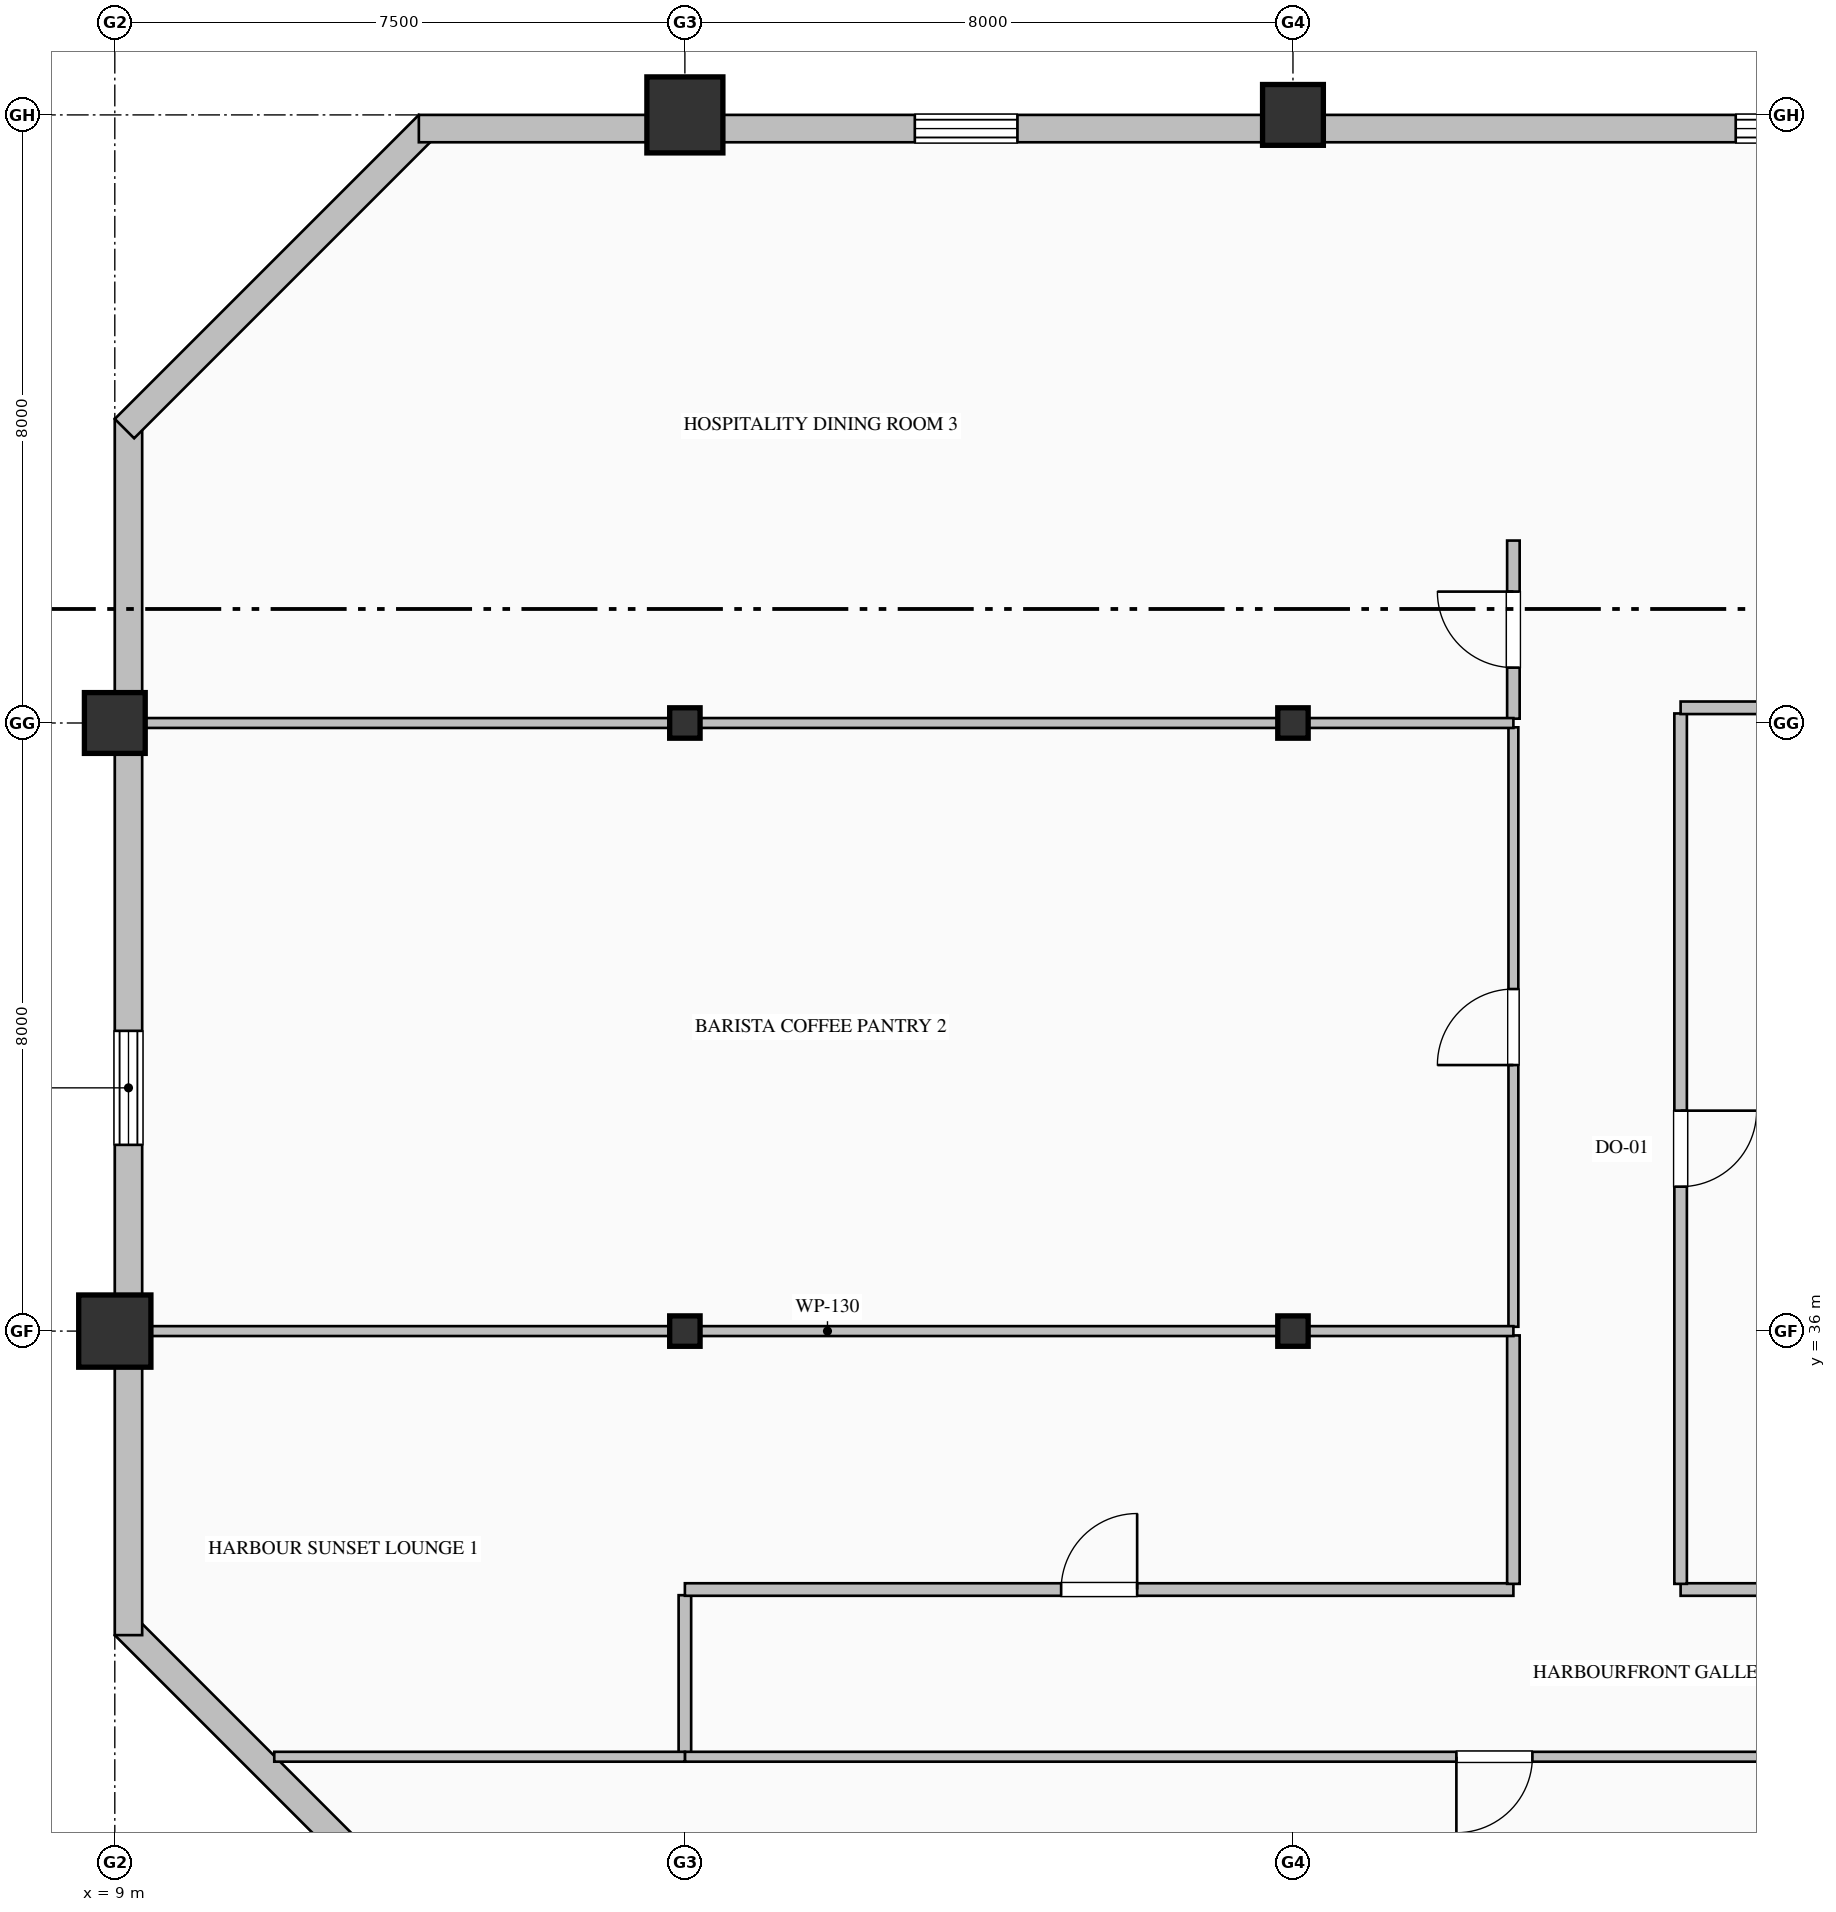
"""IFC4 building model, lengths in metres.
Left out: names, types, materials, properties, quantities, classifications, styles, units other than length and angle.
Written with IfcOpenShell. Run it as: python <this file> out.ifc"""

import sys

from ifc_helpers import new_model, si_unit, direction, frame, frame_2d, origin, origin_2d, place, context, subcontext, project, spatial, rectangle, hollow_rectangle, hollow_circle, i_section, extrude, element, fill, save


model = new_model("IFC4")
c1 = context("Model", 3, precision=1e-05, world=origin(), true_north=direction((0.0, 1.0)))
c2 = subcontext(c1, "Body", "Model", "MODEL_VIEW")
j1 = project(units=[si_unit("LENGTHUNIT", "METRE"), si_unit("PLANEANGLEUNIT", "RADIAN")], contexts=[c1])
p1 = place(None, origin())
s1 = spatial("IfcSite", under=j1, at=p1, CompositionType="ELEMENT")
p2 = place(p1, origin())
s2 = spatial("IfcBuilding", under=s1, at=p2, CompositionType="ELEMENT")
p3 = place(p2, frame((0.0, 0.0, 241.8)))
s3 = spatial("IfcBuildingStorey", under=s2, at=p3, CompositionType="ELEMENT", Elevation=241.8)
p4 = place(p3, frame((9.0, 36.0, 0.0), z_axis=(0.0, 0.0, 1.0), x_axis=(1.0, 0.0, 0.0)))
e1 = element("IfcColumn", 1, at=p4, inside=s3, PredefinedType="COLUMN", context=c2, shape_type="SweptSolid", body=[
    extrude(hollow_rectangle(XDim=0.95, YDim=0.95, WallThickness=0.036, at=origin_2d()), origin(), (0.0, 0.0, 1.0), 4.0),
])
p5 = place(p3, frame((9.0, 44.0, 0.0), z_axis=(0.0, 0.0, 1.0), x_axis=(1.0, 0.0, 0.0)))
e2 = element("IfcColumn", 2, at=p5, inside=s3, PredefinedType="COLUMN", context=c2, shape_type="SweptSolid", body=[
    extrude(hollow_rectangle(XDim=0.8, YDim=0.8, WallThickness=0.032, at=origin_2d()), origin(), (0.0, 0.0, 1.0), 4.0),
])
for number, where, z_axis, x_axis in (
    (3, (16.5, 36.0, 0.0), (0.0, 0.0, 1.0), (1.0, 0.0, 0.0)),
    (4, (16.5, 44.0, 0.0), (0.0, 0.0, 1.0), (1.0, 0.0, 0.0)),
):
    element("IfcColumn", number, at=place(p3, frame(where, z_axis=z_axis, x_axis=x_axis)), inside=s3, PredefinedType="COLUMN", context=c2, shape_type="SweptSolid", body=[
        extrude(i_section(OverallWidth=0.4, OverallDepth=0.4, WebThickness=0.013, FlangeThickness=0.021, FilletRadius=0.022, at=origin_2d()), origin(), (0.0, 0.0, 1.0), 4.0),
    ])
p6 = place(p3, frame((16.5, 52.0, 0.0), z_axis=(0.0, 0.0, 1.0), x_axis=(1.0, 0.0, 0.0)))
e5 = element("IfcColumn", 5, at=p6, inside=s3, PredefinedType="COLUMN", context=c2, shape_type="SweptSolid", body=[
    extrude(hollow_circle(Radius=0.5, WallThickness=0.036, at=origin_2d()), origin(), (0.0, 0.0, 1.0), 4.0),
])
for number, where, z_axis, x_axis in (
    (6, (24.5, 36.0, 0.0), (0.0, 0.0, 1.0), (1.0, 0.0, 0.0)),
    (7, (24.5, 44.0, 0.0), (0.0, 0.0, 1.0), (1.0, 0.0, 0.0)),
):
    element("IfcColumn", number, at=place(p3, frame(where, z_axis=z_axis, x_axis=x_axis)), inside=s3, PredefinedType="COLUMN", context=c2, shape_type="SweptSolid", body=[
        extrude(i_section(OverallWidth=0.4, OverallDepth=0.4, WebThickness=0.013, FlangeThickness=0.021, FilletRadius=0.022, at=origin_2d()), origin(), (0.0, 0.0, 1.0), 4.0),
    ])
p7 = place(p3, frame((24.5, 52.0, 0.0), z_axis=(0.0, 0.0, 1.0), x_axis=(1.0, 0.0, 0.0)))
e8 = element("IfcColumn", 8, at=p7, inside=s3, PredefinedType="COLUMN", context=c2, shape_type="SweptSolid", body=[
    extrude(hollow_rectangle(XDim=0.8, YDim=0.8, WallThickness=0.032, at=origin_2d()), origin(), (0.0, 0.0, 1.0), 4.0),
])
p8 = place(p3, frame((13.127, 28.127, 0.0), z_axis=(0.0, 0.0, 1.0), x_axis=(-0.707106781187, 0.707106781187, 0.0)))
e9 = element("IfcWall", 9, at=p8, inside=s3, PredefinedType="SOLIDWALL", context=c2, shape_type="SweptSolid", body=[
    extrude(rectangle(XDim=5.657, YDim=0.36, at=frame_2d((2.828, 0.0))), origin(), (0.0, 0.0, 1.0), 3.775),
])
p9 = place(p3, frame((9.18, 32.0, 0.0), z_axis=(0.0, 0.0, 1.0), x_axis=(0.0, 1.0, 0.0)))
e10 = element("IfcWall", 10, at=p9, inside=s3, PredefinedType="SOLIDWALL", context=c2, shape_type="SweptSolid", body=[
    extrude(rectangle(XDim=16.0, YDim=0.36, at=frame_2d((8.0, 0.0))), origin(), (0.0, 0.0, 1.0), 3.325),
])
p10 = place(p9, frame((6.45, 0.0, 0.7)))
e11 = element("IfcOpeningElement", 11, at=p10, cuts=e10, PredefinedType="OPENING", context=c2, shape_type="SweptSolid", body=[
    extrude(rectangle(XDim=1.5, YDim=2.4, at=frame_2d((0.75, 1.2))), frame((0.0, 0.19, 0.0), z_axis=(0.0, -1.0, 0.0), x_axis=(1.0, 0.0, 0.0)), (0.0, 0.0, 1.0), 0.38),
])
p11 = place(p3, frame((9.127, 47.873, 0.0), z_axis=(0.0, 0.0, 1.0), x_axis=(0.707106781187, 0.707106781187, 0.0)))
e12 = element("IfcWall", 12, at=p11, inside=s3, PredefinedType="SOLIDWALL", context=c2, shape_type="SweptSolid", body=[
    extrude(rectangle(XDim=5.657, YDim=0.36, at=frame_2d((2.828, 0.0))), origin(), (0.0, 0.0, 1.0), 3.775),
])
p12 = place(p3, frame((13.0, 51.82, 0.0), z_axis=(0.0, 0.0, 1.0), x_axis=(1.0, 0.0, 0.0)))
e13 = element("IfcWall", 13, at=p12, inside=s3, PredefinedType="SOLIDWALL", context=c2, shape_type="SweptSolid", body=[
    extrude(rectangle(XDim=27.52, YDim=0.36, at=frame_2d((13.76, 0.0))), origin(), (0.0, 0.0, 1.0), 3.325),
])
p13 = place(p12, frame((6.525, 0.0, 0.9)))
e14 = element("IfcOpeningElement", 14, at=p13, cuts=e13, PredefinedType="OPENING", context=c2, shape_type="SweptSolid", body=[
    extrude(rectangle(XDim=1.35, YDim=1.85, at=frame_2d((0.675, 0.925))), frame((0.0, 0.19, 0.0), z_axis=(0.0, -1.0, 0.0), x_axis=(1.0, 0.0, 0.0)), (0.0, 0.0, 1.0), 0.38),
])
p14 = place(p12, frame((17.325, 0.0, 0.9)))
e15 = element("IfcOpeningElement", 15, at=p14, cuts=e13, PredefinedType="OPENING", context=c2, shape_type="SweptSolid", body=[
    extrude(rectangle(XDim=1.35, YDim=1.85, at=frame_2d((0.675, 0.925))), frame((0.0, 0.19, 0.0), z_axis=(0.0, -1.0, 0.0), x_axis=(1.0, 0.0, 0.0)), (0.0, 0.0, 1.0), 0.38),
])
p15 = place(p3, frame((29.6, 32.6, 0.0), z_axis=(0.0, 0.0, 1.0), x_axis=(1.0, 0.0, 0.0)))
e16 = element("IfcWall", 16, at=p15, inside=s3, PredefinedType="PARTITIONING", context=c2, shape_type="SweptSolid", body=[
    extrude(rectangle(XDim=8.2, YDim=0.165, at=frame_2d((4.1, 0.0))), origin(), (0.0, 0.0, 1.0), 3.775),
])
p16 = place(p3, frame((16.5, 30.457, 0.0), z_axis=(0.0, 0.0, 1.0), x_axis=(0.0, 1.0, 0.0)))
e17 = element("IfcWall", 17, at=p16, inside=s3, PredefinedType="PARTITIONING", context=c2, shape_type="SweptSolid", body=[
    extrude(rectangle(XDim=2.068, YDim=0.165, at=frame_2d((1.034, 0.0))), origin(), (0.0, 0.0, 1.0), 3.179),
])
p17 = place(p3, frame((16.5, 32.6, 0.0), z_axis=(0.0, 0.0, 1.0), x_axis=(1.0, 0.0, 0.0)))
e18 = element("IfcWall", 18, at=p17, inside=s3, PredefinedType="PARTITIONING", context=c2, shape_type="SweptSolid", body=[
    extrude(rectangle(XDim=10.9, YDim=0.165, at=frame_2d((5.45, 0.0))), origin(), (0.0, 0.0, 1.0), 3.775),
])
p18 = place(p17, frame((4.95, 0.0, 0.0)))
e19 = element("IfcOpeningElement", 19, at=p18, cuts=e18, PredefinedType="OPENING", context=c2, shape_type="SweptSolid", body=[
    extrude(rectangle(XDim=1.0, YDim=2.15, at=frame_2d((0.5, 1.075))), frame((0.0, 0.093, 0.0), z_axis=(0.0, -1.0, 0.0), x_axis=(1.0, 0.0, 0.0)), (0.0, 0.0, 1.0), 0.185),
])
p19 = place(p3, frame((37.8, 30.4, 0.0), z_axis=(0.0, 0.0, 1.0), x_axis=(-1.0, 0.0, 0.0)))
e20 = element("IfcWall", 20, at=p19, inside=s3, PredefinedType="PARTITIONING", context=c2, shape_type="SweptSolid", body=[
    extrude(rectangle(XDim=21.3, YDim=0.13, at=frame_2d((10.65, 0.0))), origin(), (0.0, 0.0, 1.0), 3.775),
])
p20 = place(p19, frame((10.15, 0.0, 0.0)))
e21 = element("IfcOpeningElement", 21, at=p20, cuts=e20, PredefinedType="OPENING", context=c2, shape_type="SweptSolid", body=[
    extrude(rectangle(XDim=1.0, YDim=2.15, at=frame_2d((0.5, 1.075))), frame((0.0, 0.075, 0.0), z_axis=(0.0, -1.0, 0.0), x_axis=(1.0, 0.0, 0.0)), (0.0, 0.0, 1.0), 0.15),
])
p21 = place(p3, frame((29.6, 44.125, 0.0), z_axis=(0.0, 0.0, 1.0), x_axis=(0.0, -1.0, 0.0)))
e22 = element("IfcWall", 22, at=p21, inside=s3, PredefinedType="PARTITIONING", context=c2, shape_type="SweptSolid", body=[
    extrude(rectangle(XDim=11.451, YDim=0.165, at=frame_2d((5.726, 0.0))), origin(), (0.0, 0.0, 1.0), 3.775),
])
p22 = place(p21, frame((5.226, 0.0, 0.0)))
e23 = element("IfcOpeningElement", 23, at=p22, cuts=e22, PredefinedType="OPENING", context=c2, shape_type="SweptSolid", body=[
    extrude(rectangle(XDim=1.0, YDim=2.15, at=frame_2d((0.5, 1.075))), frame((0.0, 0.093, 0.0), z_axis=(0.0, -1.0, 0.0), x_axis=(1.0, 0.0, 0.0)), (0.0, 0.0, 1.0), 0.185),
])
p23 = place(p3, frame((27.4, 32.675, 0.0), z_axis=(0.0, 0.0, 1.0), x_axis=(0.0, 1.0, 0.0)))
e24 = element("IfcWall", 24, at=p23, inside=s3, PredefinedType="PARTITIONING", context=c2, shape_type="SweptSolid", body=[
    extrude(rectangle(XDim=3.269, YDim=0.165, at=frame_2d((1.634, 0.0))), origin(), (0.0, 0.0, 1.0), 3.775),
])
p24 = place(p3, frame((27.4, 36.057, 0.0), z_axis=(0.0, 0.0, 1.0), x_axis=(0.0, 1.0, 0.0)))
e25 = element("IfcWall", 25, at=p24, inside=s3, PredefinedType="PARTITIONING", context=c2, shape_type="SweptSolid", body=[
    extrude(rectangle(XDim=7.886, YDim=0.13, at=frame_2d((3.943, 0.0))), origin(), (0.0, 0.0, 1.0), 3.775),
])
p25 = place(p24, frame((3.443, 0.0, 0.0)))
e26 = element("IfcOpeningElement", 26, at=p25, cuts=e25, PredefinedType="OPENING", context=c2, shape_type="SweptSolid", body=[
    extrude(rectangle(XDim=1.0, YDim=2.15, at=frame_2d((0.5, 1.075))), frame((0.0, 0.075, 0.0), z_axis=(0.0, -1.0, 0.0), x_axis=(1.0, 0.0, 0.0)), (0.0, 0.0, 1.0), 0.15),
])
p26 = place(p3, frame((27.4, 44.057, 0.0), z_axis=(0.0, 0.0, 1.0), x_axis=(0.0, 1.0, 0.0)))
e27 = element("IfcWall", 27, at=p26, inside=s3, PredefinedType="PARTITIONING", context=c2, shape_type="SweptSolid", body=[
    extrude(rectangle(XDim=2.343, YDim=0.165, at=frame_2d((1.171, 0.0))), origin(), (0.0, 0.0, 1.0), 3.775),
])
p27 = place(p26, frame((0.671, 0.0, 0.0)))
e28 = element("IfcOpeningElement", 28, at=p27, cuts=e27, PredefinedType="OPENING", context=c2, shape_type="SweptSolid", body=[
    extrude(rectangle(XDim=1.0, YDim=2.15, at=frame_2d((0.5, 1.075))), frame((0.0, 0.093, 0.0), z_axis=(0.0, -1.0, 0.0), x_axis=(1.0, 0.0, 0.0)), (0.0, 0.0, 1.0), 0.185),
])
p28 = place(p3, frame((37.8, 44.2, 0.0), z_axis=(0.0, 0.0, 1.0), x_axis=(-1.0, 0.0, 0.0)))
e29 = element("IfcWall", 29, at=p28, inside=s3, PredefinedType="PARTITIONING", context=c2, shape_type="SweptSolid", body=[
    extrude(rectangle(XDim=8.2, YDim=0.165, at=frame_2d((4.1, 0.0))), origin(), (0.0, 0.0, 1.0), 3.775),
])
p29 = place(p3, frame((9.352, 36.0, 0.0), z_axis=(0.0, 0.0, 1.0), x_axis=(1.0, 0.0, 0.0)))
e30 = element("IfcWall", 30, at=p29, inside=s3, PredefinedType="PARTITIONING", context=c2, shape_type="SweptSolid", body=[
    extrude(rectangle(XDim=18.048, YDim=0.13, at=frame_2d((9.024, 0.0))), origin(), (0.0, 0.0, 1.0), 3.179),
])
p30 = place(p3, frame((16.5, 30.4, 0.0), z_axis=(0.0, 0.0, 1.0), x_axis=(-1.0, 0.0, 0.0)))
e31 = element("IfcWall", 31, at=p30, inside=s3, PredefinedType="PARTITIONING", context=c2, shape_type="SweptSolid", body=[
    extrude(rectangle(XDim=5.402, YDim=0.13, at=frame_2d((2.701, 0.0))), origin(), (0.0, 0.0, 1.0), 3.775),
])
p31 = place(p3, frame((9.352, 44.0, 0.0), z_axis=(0.0, 0.0, 1.0), x_axis=(1.0, 0.0, 0.0)))
e32 = element("IfcWall", 32, at=p31, inside=s3, PredefinedType="PARTITIONING", context=c2, shape_type="SweptSolid", body=[
    extrude(rectangle(XDim=18.048, YDim=0.13, at=frame_2d((9.024, 0.0))), origin(), (0.0, 0.0, 1.0), 3.179),
])
p32 = place(p10, origin())
e33 = element("IfcWindow", 33, at=p32, inside=s3, PartitioningType="DOUBLE_PANEL_HORIZONTAL", PredefinedType="WINDOW", context=c2, shape_type="SweptSolid", body=[
    extrude(rectangle(XDim=1.5, YDim=2.4, at=frame_2d((0.75, 1.2))), frame((0.0, 0.15, 0.0), z_axis=(0.0, -1.0, 0.0), x_axis=(1.0, 0.0, 0.0)), (0.0, 0.0, 1.0), 0.06),
])
fill(e11, e33)
p33 = place(p13, origin())
e34 = element("IfcWindow", 34, at=p33, inside=s3, PartitioningType="DOUBLE_PANEL_VERTICAL", PredefinedType="WINDOW", context=c2, shape_type="SweptSolid", body=[
    extrude(rectangle(XDim=1.35, YDim=1.85, at=frame_2d((0.675, 0.925))), frame((0.0, 0.15, 0.0), z_axis=(0.0, -1.0, 0.0), x_axis=(1.0, 0.0, 0.0)), (0.0, 0.0, 1.0), 0.06),
])
fill(e14, e34)
p34 = place(p14, origin())
e35 = element("IfcWindow", 35, at=p34, inside=s3, PartitioningType="DOUBLE_PANEL_VERTICAL", PredefinedType="WINDOW", context=c2, shape_type="SweptSolid", body=[
    extrude(rectangle(XDim=1.35, YDim=1.85, at=frame_2d((0.675, 0.925))), frame((0.0, 0.15, 0.0), z_axis=(0.0, -1.0, 0.0), x_axis=(1.0, 0.0, 0.0)), (0.0, 0.0, 1.0), 0.06),
])
fill(e15, e35)
p35 = place(p22, origin())
e36 = element("IfcDoor", 36, at=p35, inside=s3, OperationType="SINGLE_SWING_LEFT", PredefinedType="DOOR", context=c2, shape_type="SweptSolid", body=[
    extrude(rectangle(XDim=1.0, YDim=2.15, at=frame_2d((0.5, 1.075))), frame((0.0, 0.025, 0.0), z_axis=(0.0, -1.0, 0.0), x_axis=(1.0, 0.0, 0.0)), (0.0, 0.0, 1.0), 0.05),
])
fill(e23, e36)
p36 = place(p18, origin())
e37 = element("IfcDoor", 37, at=p36, inside=s3, OperationType="SINGLE_SWING_RIGHT", PredefinedType="DOOR", context=c2, shape_type="SweptSolid", body=[
    extrude(rectangle(XDim=1.0, YDim=2.15, at=frame_2d((0.5, 1.075))), frame((0.0, 0.025, 0.0), z_axis=(0.0, -1.0, 0.0), x_axis=(1.0, 0.0, 0.0)), (0.0, 0.0, 1.0), 0.05),
])
fill(e19, e37)
p37 = place(p25, origin())
e38 = element("IfcDoor", 38, at=p37, inside=s3, OperationType="SINGLE_SWING_LEFT", PredefinedType="DOOR", context=c2, shape_type="SweptSolid", body=[
    extrude(rectangle(XDim=1.0, YDim=2.15, at=frame_2d((0.5, 1.075))), frame((0.0, 0.025, 0.0), z_axis=(0.0, -1.0, 0.0), x_axis=(1.0, 0.0, 0.0)), (0.0, 0.0, 1.0), 0.05),
])
fill(e26, e38)
p38 = place(p27, origin())
e39 = element("IfcDoor", 39, at=p38, inside=s3, OperationType="SINGLE_SWING_RIGHT", PredefinedType="DOOR", context=c2, shape_type="SweptSolid", body=[
    extrude(rectangle(XDim=1.0, YDim=2.15, at=frame_2d((0.5, 1.075))), frame((0.0, 0.025, 0.0), z_axis=(0.0, -1.0, 0.0), x_axis=(1.0, 0.0, 0.0)), (0.0, 0.0, 1.0), 0.05),
])
fill(e28, e39)
p39 = place(p20, origin())
e40 = element("IfcDoor", 40, at=p39, inside=s3, OperationType="SINGLE_SWING_RIGHT", PredefinedType="DOOR", context=c2, shape_type="SweptSolid", body=[
    extrude(rectangle(XDim=1.0, YDim=2.15, at=frame_2d((0.5, 1.075))), frame((0.0, 0.025, 0.0), z_axis=(0.0, -1.0, 0.0), x_axis=(1.0, 0.0, 0.0)), (0.0, 0.0, 1.0), 0.05),
])
fill(e21, e40)
save(model, sys.argv[1])
